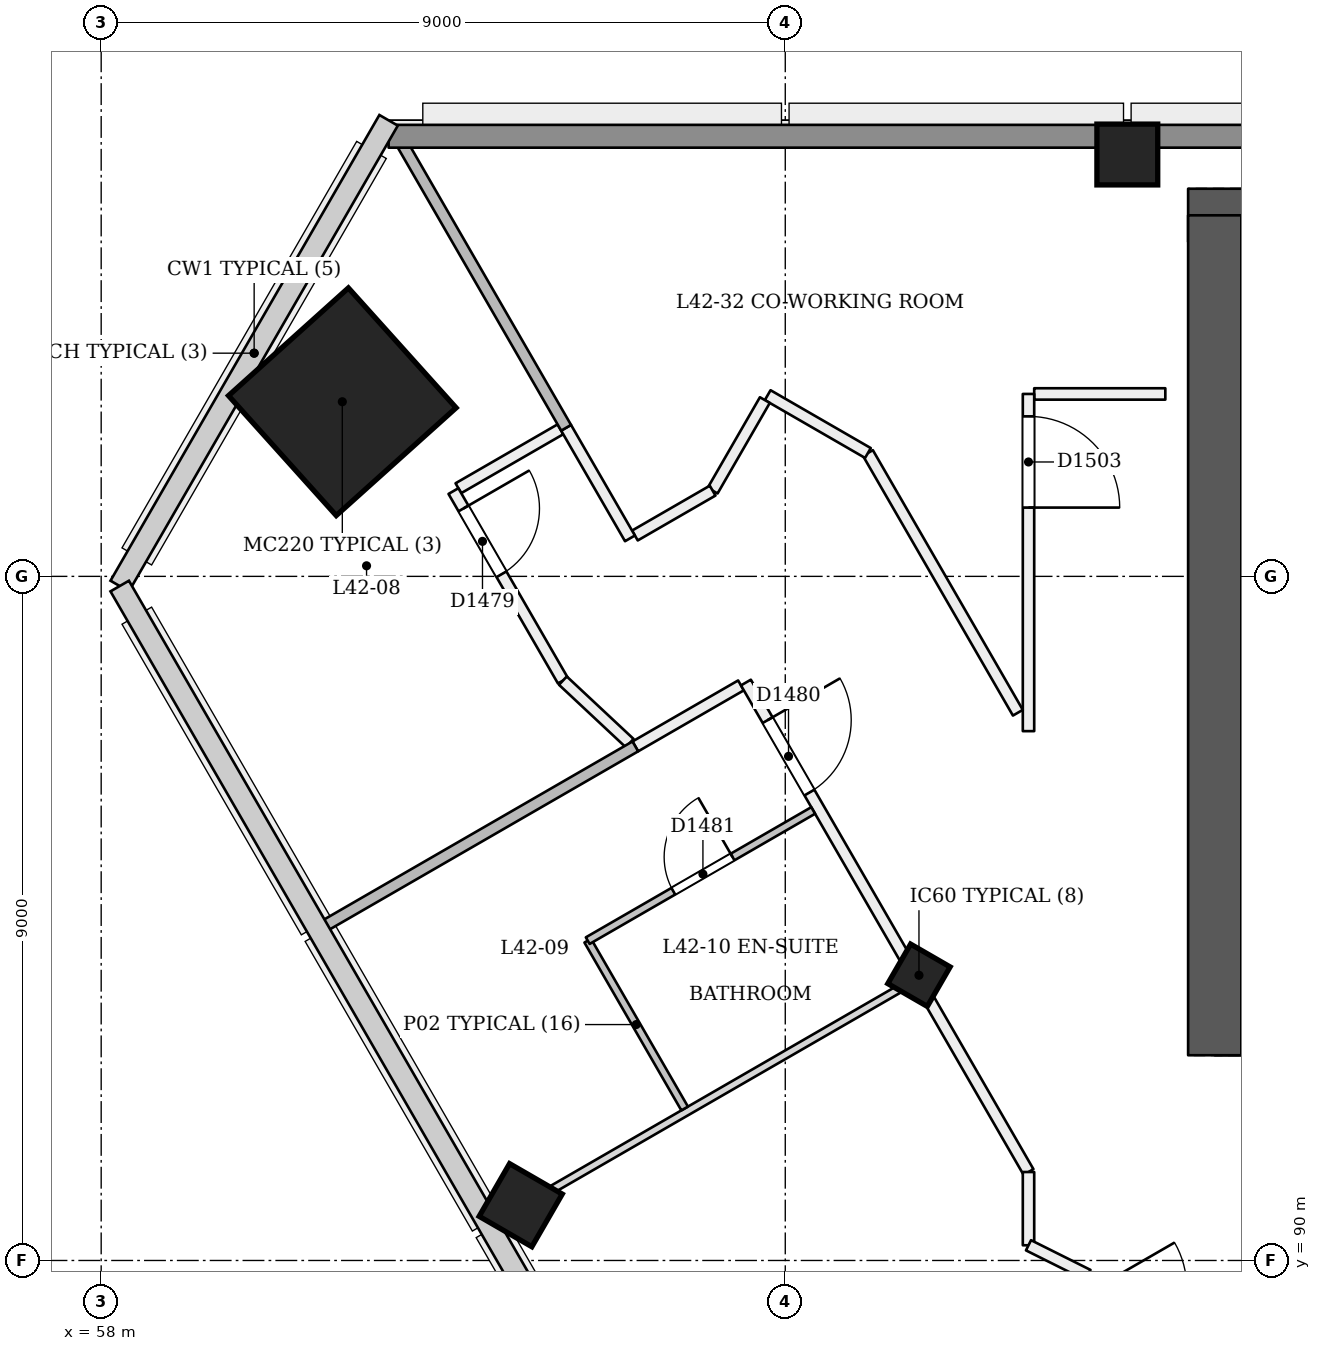
"""IFC4 building model, lengths in metres.
Left out: names, types, materials, properties, quantities, classifications, styles, units other than length and angle.
Written with IfcOpenShell. Run it as: python <this file> out.ifc"""

import sys

from ifc_helpers import new_model, si_unit, direction, frame, frame_2d, origin, origin_2d, place, context, subcontext, project, spatial, rectangle, extrude, element, fill, save


model = new_model("IFC4")
c1 = context("Model", 3, precision=1e-05, world=origin(), true_north=direction((0.0, 1.0)))
c2 = subcontext(c1, "Body", "Model", "MODEL_VIEW")
j1 = project(units=[si_unit("LENGTHUNIT", "METRE"), si_unit("PLANEANGLEUNIT", "RADIAN")], contexts=[c1])
p1 = place(None, origin())
s1 = spatial("IfcSite", under=j1, at=p1, CompositionType="ELEMENT")
p2 = place(p1, origin())
s2 = spatial("IfcBuilding", under=s1, at=p2, CompositionType="ELEMENT")
p3 = place(p2, frame((0.0, 0.0, 163.8)))
s3 = spatial("IfcBuildingStorey", under=s2, at=p3, CompositionType="ELEMENT", Elevation=163.8)
p4 = place(p3, frame((72.65, 93.05, 0.0), z_axis=(0.0, 0.0, 1.0), x_axis=(1.0, 0.0, 0.0)))
e1 = element("IfcWall", 1, at=p4, inside=s3, PredefinedType="SHEAR", context=c2, shape_type="SweptSolid", body=[
    extrude(rectangle(XDim=25.05, YDim=0.7, at=frame_2d((12.525, 0.0))), origin(), (0.0, 0.0, 1.0), 3.6),
])
p5 = place(p4, frame((1.15, 0.0, 0.0)))
e2 = element("IfcOpeningElement", 2, at=p5, cuts=e1, PredefinedType="OPENING", context=c2, shape_type="SweptSolid", body=[
    extrude(rectangle(XDim=1.2, YDim=2.1, at=frame_2d((0.6, 1.05))), frame((0.0, 0.36, 0.0), z_axis=(0.0, -1.0, 0.0), x_axis=(1.0, 0.0, 0.0)), (0.0, 0.0, 1.0), 0.721),
])
p6 = place(p4, frame((3.35, 0.0, 0.0)))
e3 = element("IfcOpeningElement", 3, at=p6, cuts=e1, PredefinedType="OPENING", context=c2, shape_type="SweptSolid", body=[
    extrude(rectangle(XDim=1.2, YDim=2.1, at=frame_2d((0.6, 1.05))), frame((0.0, 0.36, 0.0), z_axis=(0.0, -1.0, 0.0), x_axis=(1.0, 0.0, 0.0)), (0.0, 0.0, 1.0), 0.721),
])
p7 = place(p4, frame((13.35, 0.0, 0.0)))
e4 = element("IfcOpeningElement", 4, at=p7, cuts=e1, PredefinedType="OPENING", context=c2, shape_type="SweptSolid", body=[
    extrude(rectangle(XDim=1.2, YDim=2.1, at=frame_2d((0.6, 1.05))), frame((0.0, 0.36, 0.0), z_axis=(0.0, -1.0, 0.0), x_axis=(1.0, 0.0, 0.0)), (0.0, 0.0, 1.0), 0.721),
])
p8 = place(p4, frame((16.762, 0.0, 0.0)))
e5 = element("IfcOpeningElement", 5, at=p8, cuts=e1, PredefinedType="OPENING", context=c2, shape_type="SweptSolid", body=[
    extrude(rectangle(XDim=1.0, YDim=2.1, at=frame_2d((0.5, 1.05))), frame((0.0, 0.36, 0.0), z_axis=(0.0, -1.0, 0.0), x_axis=(1.0, 0.0, 0.0)), (0.0, 0.0, 1.0), 0.721),
])
p9 = place(p4, frame((20.65, 0.0, 0.0)))
e6 = element("IfcOpeningElement", 6, at=p9, cuts=e1, PredefinedType="OPENING", context=c2, shape_type="SweptSolid", body=[
    extrude(rectangle(XDim=1.0, YDim=2.1, at=frame_2d((0.5, 1.05))), frame((0.0, 0.36, 0.0), z_axis=(0.0, -1.0, 0.0), x_axis=(1.0, 0.0, 0.0)), (0.0, 0.0, 1.0), 0.721),
])
p10 = place(p4, frame((23.087, 0.0, 0.0)))
e7 = element("IfcOpeningElement", 7, at=p10, cuts=e1, PredefinedType="OPENING", context=c2, shape_type="SweptSolid", body=[
    extrude(rectangle(XDim=1.0, YDim=2.1, at=frame_2d((0.5, 1.05))), frame((0.0, 0.36, 0.0), z_axis=(0.0, -1.0, 0.0), x_axis=(1.0, 0.0, 0.0)), (0.0, 0.0, 1.0), 0.721),
])
p11 = place(p3, frame((97.35, 103.75, 0.0), z_axis=(0.0, 0.0, 1.0), x_axis=(-1.0, 0.0, 0.0)))
e8 = element("IfcWall", 8, at=p11, inside=s3, PredefinedType="SHEAR", context=c2, shape_type="SweptSolid", body=[
    extrude(rectangle(XDim=25.05, YDim=0.7, at=frame_2d((12.525, 0.0))), origin(), (0.0, 0.0, 1.0), 3.6),
])
p12 = place(p3, frame((72.65, 103.75, 0.0), z_axis=(0.0, 0.0, 1.0), x_axis=(0.0, -1.0, 0.0)))
e9 = element("IfcWall", 9, at=p12, inside=s3, PredefinedType="SHEAR", context=c2, shape_type="SweptSolid", body=[
    extrude(rectangle(XDim=11.05, YDim=0.7, at=frame_2d((5.525, 0.0))), origin(), (0.0, 0.0, 1.0), 3.6),
])
p13 = place(p3, frame((68.732, 93.705, -0.02), z_axis=(0.022212328788, 0.038465252292, 0.999013031354), x_axis=(-0.86563975744, -0.499187423735, 0.03846721103)))
e10 = element("IfcColumn", 10, at=p13, inside=s3, PredefinedType="COLUMN", context=c2, shape_type="SweptSolid", body=[
    extrude(rectangle(XDim=0.6, YDim=0.6, at=origin_2d()), origin(), (0.0, 0.0, 1.0), 3.605),
])
p14 = place(p3, frame((61.138, 101.286, 0.0), z_axis=(0.028335986449, 0.009287153453, 0.999555311452), x_axis=(-0.866551229703, 0.498689963997, 0.019932037229)))
e11 = element("IfcColumn", 11, at=p14, inside=s3, PredefinedType="COLUMN", context=c2, shape_type="SweptSolid", body=[
    extrude(rectangle(XDim=2.12, YDim=2.12, at=origin_2d()), origin(), (0.0, 0.0, 1.0), 3.602),
])
p15 = place(p3, frame((71.5, 104.55, 0.0), z_axis=(0.0, 0.0, 1.0), x_axis=(1.0, 0.0, 0.0)))
e12 = element("IfcColumn", 12, at=p15, inside=s3, PredefinedType="COLUMN", context=c2, shape_type="SweptSolid", body=[
    extrude(rectangle(XDim=0.8, YDim=0.8, at=origin_2d()), origin(), (0.0, 0.0, 1.0), 3.6),
])
p16 = place(p3, frame((63.492, 90.68, -0.026), z_axis=(0.022212386598, 0.038397631711, 0.99901563139), x_axis=(-0.866019050673, -0.498533012583, 0.038416653115)))
e13 = element("IfcColumn", 13, at=p16, inside=s3, PredefinedType="COLUMN", context=c2, shape_type="SweptSolid", body=[
    extrude(rectangle(XDim=0.8, YDim=0.8, at=origin_2d()), origin(), (0.0, 0.0, 1.0), 3.605),
])
p17 = place(p3, frame((64.042, 100.935, 0.0), z_axis=(0.0, 0.0, 1.0), x_axis=(-0.865975732936, -0.500086022567, 0.0)))
e14 = element("IfcWall", 14, at=p17, inside=s3, PredefinedType="PARTITIONING", context=c2, shape_type="SweptSolid", body=[
    extrude(rectangle(XDim=1.55, YDim=0.15, at=frame_2d((0.775, 0.0))), origin(), (0.0, 0.0, 1.0), 3.15),
])
p18 = place(p3, frame((62.635, 100.122, 0.0), z_axis=(0.0, 0.0, 1.0), x_axis=(0.499986626058, -0.866033125095, 0.0)))
e15 = element("IfcWall", 15, at=p18, inside=s3, PredefinedType="PARTITIONING", context=c2, shape_type="SweptSolid", body=[
    extrude(rectangle(XDim=2.88, YDim=0.15, at=frame_2d((1.44, 0.0))), origin(), (0.0, 0.0, 1.0), 3.15),
])
p19 = place(p18, frame((0.264, 0.0, 0.0)))
e16 = element("IfcOpeningElement", 16, at=p19, cuts=e15, PredefinedType="OPENING", context=c2, shape_type="SweptSolid", body=[
    extrude(rectangle(XDim=1.0, YDim=2.1, at=frame_2d((0.5, 1.05))), frame((0.0, 0.085, 0.0), z_axis=(0.0, -1.0, 0.0), x_axis=(1.0, 0.0, 0.0)), (0.0, 0.0, 1.0), 0.171),
])
p20 = place(p3, frame((64.074, 97.628, 0.0), z_axis=(0.0, 0.0, 1.0), x_axis=(0.730353054174, -0.683069847277, 0.0)))
e17 = element("IfcWall", 17, at=p20, inside=s3, PredefinedType="PARTITIONING", context=c2, shape_type="SweptSolid", body=[
    extrude(rectangle(XDim=1.203, YDim=0.15, at=frame_2d((0.602, 0.0))), origin(), (0.0, 0.0, 1.0), 3.15),
])
p21 = place(p3, frame((65.027, 96.763, 0.0), z_axis=(0.0, 0.0, 1.0), x_axis=(0.866015857963, 0.500016533484, 0.0)))
e18 = element("IfcWall", 18, at=p21, inside=s3, PredefinedType="PARTITIONING", context=c2, shape_type="SweptSolid", body=[
    extrude(rectangle(XDim=1.605, YDim=0.15, at=frame_2d((0.802, 0.0))), origin(), (0.0, 0.0, 1.0), 3.15),
])
p22 = place(p3, frame((66.482, 97.603, 0.0), z_axis=(0.0, 0.0, 1.0), x_axis=(0.499995303914, -0.866028115054, 0.0)))
e19 = element("IfcWall", 19, at=p22, inside=s3, PredefinedType="PARTITIONING", context=c2, shape_type="SweptSolid", body=[
    extrude(rectangle(XDim=7.436, YDim=0.15, at=frame_2d((3.718, 0.0))), origin(), (0.0, 0.0, 1.0), 2.75),
])
p23 = place(p22, frame((0.571, 0.0, 0.0)))
e20 = element("IfcOpeningElement", 20, at=p23, cuts=e19, PredefinedType="OPENING", context=c2, shape_type="SweptSolid", body=[
    extrude(rectangle(XDim=1.1, YDim=2.1, at=frame_2d((0.55, 1.05))), frame((0.0, 0.085, 0.0), z_axis=(0.0, -1.0, 0.0), x_axis=(1.0, 0.0, 0.0)), (0.0, 0.0, 1.0), 0.171),
])
p24 = place(p3, frame((70.2, 91.164, 0.0), z_axis=(0.0, 0.0, 1.0), x_axis=(0.0, -1.0, 0.0)))
e21 = element("IfcWall", 21, at=p24, inside=s3, PredefinedType="PARTITIONING", context=c2, shape_type="SweptSolid", body=[
    extrude(rectangle(XDim=0.964, YDim=0.15, at=frame_2d((0.482, 0.0))), origin(), (0.0, 0.0, 1.0), 3.15),
])
p25 = place(p3, frame((70.2, 90.2, 0.0), z_axis=(0.0, 0.0, 1.0), x_axis=(0.89453884087, -0.44699022604, 0.0)))
e22 = element("IfcWall", 22, at=p25, inside=s3, PredefinedType="PARTITIONING", context=c2, shape_type="SweptSolid", body=[
    extrude(rectangle(XDim=0.875, YDim=0.15, at=frame_2d((0.437, 0.0))), origin(), (0.0, 0.0, 1.0), 3.15),
])
p26 = place(p3, frame((72.0, 101.4, 0.0), z_axis=(0.0, 0.0, 1.0), x_axis=(-1.0, 0.0, 0.0)))
e23 = element("IfcWall", 23, at=p26, inside=s3, PredefinedType="PARTITIONING", context=c2, shape_type="SweptSolid", body=[
    extrude(rectangle(XDim=1.725, YDim=0.15, at=frame_2d((0.863, 0.0))), origin(), (0.0, 0.0, 1.0), 3.15),
])
p27 = place(p3, frame((70.2, 101.4, 0.0), z_axis=(0.0, 0.0, 1.0), x_axis=(0.0, -1.0, 0.0)))
e24 = element("IfcWall", 24, at=p27, inside=s3, PredefinedType="PARTITIONING", context=c2, shape_type="SweptSolid", body=[
    extrude(rectangle(XDim=4.436, YDim=0.15, at=frame_2d((2.218, 0.0))), origin(), (0.0, 0.0, 1.0), 3.15),
])
p28 = place(p27, frame((0.295, 0.0, 0.0)))
e25 = element("IfcOpeningElement", 25, at=p28, cuts=e24, PredefinedType="OPENING", context=c2, shape_type="SweptSolid", body=[
    extrude(rectangle(XDim=1.2, YDim=2.1, at=frame_2d((0.6, 1.05))), frame((0.0, 0.085, 0.0), z_axis=(0.0, -1.0, 0.0), x_axis=(1.0, 0.0, 0.0)), (0.0, 0.0, 1.0), 0.171),
])
p29 = place(p3, frame((70.06, 97.206, 0.0), z_axis=(0.0, 0.0, 1.0), x_axis=(-0.499999210213, 0.866025859768, 0.0)))
e26 = element("IfcWall", 26, at=p29, inside=s3, PredefinedType="PARTITIONING", context=c2, shape_type="SweptSolid", body=[
    extrude(rectangle(XDim=3.945, YDim=0.15, at=frame_2d((1.973, 0.0))), origin(), (0.0, 0.0, 1.0), 3.15),
])
p30 = place(p3, frame((68.087, 100.623, 0.0), z_axis=(0.0, 0.0, 1.0), x_axis=(-0.866044067064, 0.499967672858, 0.0)))
e27 = element("IfcWall", 27, at=p30, inside=s3, PredefinedType="PARTITIONING", context=c2, shape_type="SweptSolid", body=[
    extrude(rectangle(XDim=1.522, YDim=0.15, at=frame_2d((0.761, 0.0))), origin(), (0.0, 0.0, 1.0), 3.15),
])
p31 = place(p3, frame((66.731, 101.319, 0.0), z_axis=(0.0, 0.0, 1.0), x_axis=(-0.499538027471, -0.866291959509, 0.0)))
e28 = element("IfcWall", 28, at=p31, inside=s3, PredefinedType="PARTITIONING", context=c2, shape_type="SweptSolid", body=[
    extrude(rectangle(XDim=1.375, YDim=0.15, at=frame_2d((0.688, 0.0))), origin(), (0.0, 0.0, 1.0), 3.15),
])
p32 = place(p3, frame((66.044, 100.128, 0.0), z_axis=(0.0, 0.0, 1.0), x_axis=(-0.866071977875, -0.499919322631, 0.0)))
e29 = element("IfcWall", 29, at=p32, inside=s3, PredefinedType="PARTITIONING", context=c2, shape_type="SweptSolid", body=[
    extrude(rectangle(XDim=1.181, YDim=0.15, at=frame_2d((0.59, 0.0))), origin(), (0.0, 0.0, 1.0), 3.15),
])
p33 = place(p3, frame((64.957, 99.5, 0.0), z_axis=(0.0, 0.0, 1.0), x_axis=(-0.500062097304, 0.865989548921, 0.0)))
e30 = element("IfcWall", 30, at=p33, inside=s3, PredefinedType="PARTITIONING", context=c2, shape_type="SweptSolid", body=[
    extrude(rectangle(XDim=1.68, YDim=0.15, at=frame_2d((0.84, 0.0))), origin(), (0.0, 0.0, 1.0), 3.15),
])
p34 = place(p3, frame((60.922, 94.393, 0.0), z_axis=(0.0, 0.0, 1.0), x_axis=(0.866028632512, 0.499994407638, 0.0)))
e31 = element("IfcWall", 31, at=p34, inside=s3, PredefinedType="PARTITIONING", context=c2, shape_type="SweptSolid", body=[
    extrude(rectangle(XDim=4.74, YDim=0.15, at=frame_2d((2.37, 0.0))), origin(), (0.0, 0.0, 1.0), 2.65),
])
p35 = place(p3, frame((64.117, 100.955, 0.0), z_axis=(0.0, 0.0, 1.0), x_axis=(-0.499983800959, 0.866034756103, 0.0)))
e32 = element("IfcWall", 32, at=p35, inside=s3, PredefinedType="PARTITIONING", context=c2, shape_type="SweptSolid", body=[
    extrude(rectangle(XDim=4.555, YDim=0.15, at=frame_2d((2.278, 0.0))), origin(), (0.0, 0.0, 1.0), 2.65),
])
p36 = place(p3, frame((65.676, 92.0, 0.0), z_axis=(0.0, 0.0, 1.0), x_axis=(-0.499990435942, 0.866030925526, 0.0)))
e33 = element("IfcWall", 33, at=p36, inside=s3, PredefinedType="PARTITIONING", context=c2, shape_type="SweptSolid", body=[
    extrude(rectangle(XDim=2.55, YDim=0.1, at=frame_2d((1.275, 0.0))), origin(), (0.0, 0.0, 1.0), 2.75),
])
p37 = place(p3, frame((64.401, 94.208, 0.0), z_axis=(0.0, 0.0, 1.0), x_axis=(0.866032454348, 0.499987787867, 0.0)))
e34 = element("IfcWall", 34, at=p37, inside=s3, PredefinedType="PARTITIONING", context=c2, shape_type="SweptSolid", body=[
    extrude(rectangle(XDim=3.425, YDim=0.1, at=frame_2d((1.712, 0.0))), origin(), (0.0, 0.0, 1.0), 3.15),
])
p38 = place(p37, frame((1.3, 0.0, 0.0)))
e35 = element("IfcOpeningElement", 35, at=p38, cuts=e34, PredefinedType="OPENING", context=c2, shape_type="SweptSolid", body=[
    extrude(rectangle(XDim=0.9, YDim=2.1, at=frame_2d((0.45, 1.05))), frame((0.0, 0.061, 0.0), z_axis=(0.0, -1.0, 0.0), x_axis=(1.0, 0.0, 0.0)), (0.0, 0.0, 1.0), 0.121),
])
p39 = place(p3, frame((63.19, 90.506, 0.0), z_axis=(0.0, 0.0, 1.0), x_axis=(0.866015887322, 0.500016482634, 0.0)))
e36 = element("IfcWall", 36, at=p39, inside=s3, PredefinedType="PARTITIONING", context=c2, shape_type="SweptSolid", body=[
    extrude(rectangle(XDim=6.325, YDim=0.1, at=frame_2d((3.163, 0.0))), origin(), (0.0, 0.0, 1.0), 2.65),
])
p40 = place(p3, frame((61.781, 104.79, 0.0), z_axis=(0.0, 0.0, 1.0), x_axis=(1.0, 0.0, 0.0)))
e37 = element("IfcWall", 37, at=p40, inside=s3, PredefinedType="SOLIDWALL", context=c2, shape_type="SweptSolid", body=[
    extrude(rectangle(XDim=46.438, YDim=0.3, at=frame_2d((23.219, 0.0))), origin(), (0.0, 0.0, 1.0), 2.65),
])
p41 = place(p19, origin())
e38 = element("IfcDoor", 38, at=p41, inside=s3, OperationType="SINGLE_SWING_LEFT", PredefinedType="NOTDEFINED", context=c2, shape_type="SweptSolid", body=[
    extrude(rectangle(XDim=1.0, YDim=2.1, at=frame_2d((0.5, 1.05))), frame((0.0, 0.025, 0.0), z_axis=(0.0, -1.0, 0.0), x_axis=(1.0, 0.0, 0.0)), (0.0, 0.0, 1.0), 0.05),
])
fill(e16, e38)
p42 = place(p23, origin())
e39 = element("IfcDoor", 39, at=p42, inside=s3, OperationType="SINGLE_SWING_LEFT", PredefinedType="NOTDEFINED", context=c2, shape_type="SweptSolid", body=[
    extrude(rectangle(XDim=1.1, YDim=2.1, at=frame_2d((0.55, 1.05))), frame((0.0, 0.025, 0.0), z_axis=(0.0, -1.0, 0.0), x_axis=(1.0, 0.0, 0.0)), (0.0, 0.0, 1.0), 0.05),
])
fill(e20, e39)
p43 = place(p38, origin())
e40 = element("IfcDoor", 40, at=p43, inside=s3, OperationType="SINGLE_SWING_RIGHT", PredefinedType="NOTDEFINED", context=c2, shape_type="SweptSolid", body=[
    extrude(rectangle(XDim=0.9, YDim=2.1, at=frame_2d((0.45, 1.05))), frame((0.0, 0.025, 0.0), z_axis=(0.0, -1.0, 0.0), x_axis=(1.0, 0.0, 0.0)), (0.0, 0.0, 1.0), 0.05),
])
fill(e35, e40)
p44 = place(p28, origin())
e41 = element("IfcDoor", 41, at=p44, inside=s3, OperationType="SINGLE_SWING_RIGHT", PredefinedType="NOTDEFINED", context=c2, shape_type="SweptSolid", body=[
    extrude(rectangle(XDim=1.2, YDim=2.1, at=frame_2d((0.6, 1.05))), frame((0.0, 0.025, 0.0), z_axis=(0.0, -1.0, 0.0), x_axis=(1.0, 0.0, 0.0)), (0.0, 0.0, 1.0), 0.05),
])
fill(e25, e41)
save(model, sys.argv[1])
